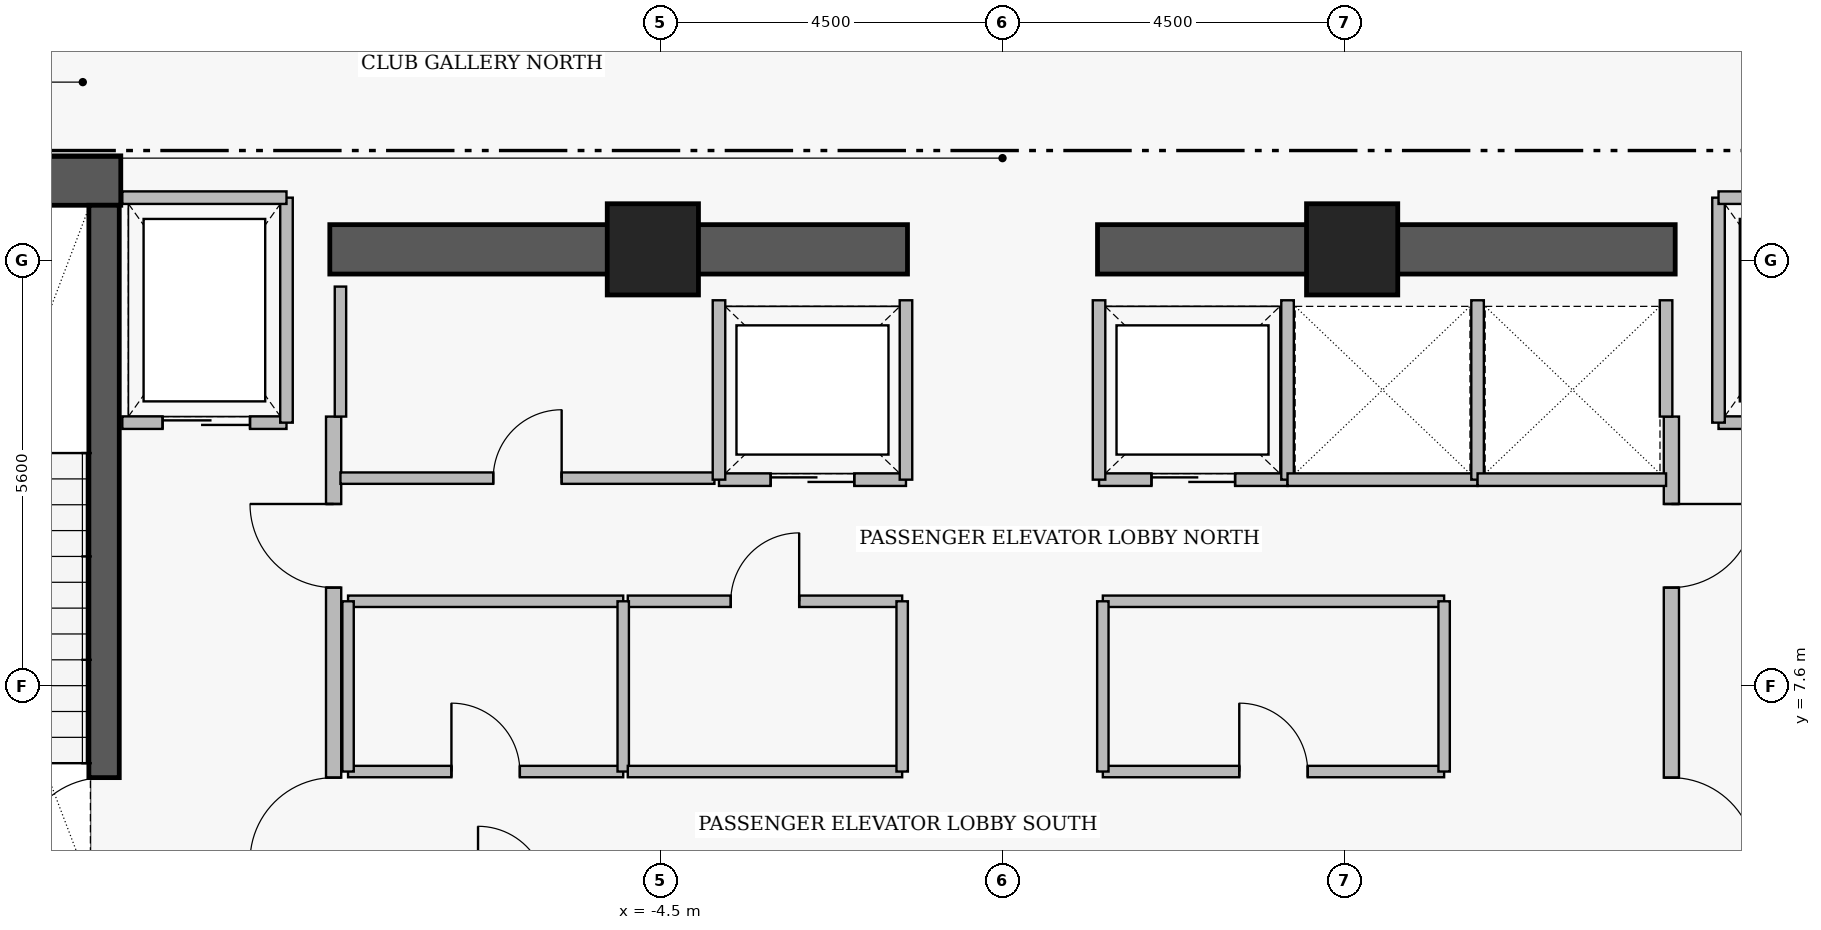
"""IFC4 building model, lengths in metres.
Left out: names, types, materials, properties, quantities, classifications, styles, units other than length and angle.
Written with IfcOpenShell. Run it as: python <this file> out.ifc"""

import sys

from ifc_helpers import new_model, si_unit, direction, frame, frame_2d, origin, origin_2d, place, context, subcontext, project, spatial, rectangle, extrude, element, fill, save


model = new_model("IFC4")
c1 = context("Model", 3, precision=1e-05, world=origin(), true_north=direction((0.0, 1.0)))
c2 = subcontext(c1, "Body", "Model", "MODEL_VIEW")
j1 = project(units=[si_unit("LENGTHUNIT", "METRE"), si_unit("PLANEANGLEUNIT", "RADIAN")], contexts=[c1])
p1 = place(None, origin())
s1 = spatial("IfcSite", under=j1, at=p1, CompositionType="ELEMENT")
p2 = place(p1, origin())
s2 = spatial("IfcBuilding", under=s1, at=p2, CompositionType="ELEMENT")
p3 = place(p2, frame((0.0, 0.0, 172.8)))
s3 = spatial("IfcBuildingStorey", under=s2, at=p3, CompositionType="ELEMENT", Elevation=172.8)
p4 = place(p3, frame((-16.06, 14.255, 0.0), z_axis=(0.0, 0.0, 1.0), x_axis=(1.0, 0.0, 0.0)))
e1 = element("IfcWall", 1, at=p4, inside=s3, PredefinedType="SHEAR", context=c2, shape_type="SweptSolid", body=[
    extrude(rectangle(XDim=4.46, YDim=0.65, at=frame_2d((2.23, 0.0))), origin(), (0.0, 0.0, 1.0), 4.41),
])
for number, where, z_axis, x_axis in (
    (2, (-8.85, 13.35, 0.0), (0.0, 0.0, 1.0), (1.0, 0.0, 0.0)),
    (3, (1.25, 13.35, 0.0), (0.0, 0.0, 1.0), (1.0, 0.0, 0.0)),
):
    element("IfcWall", number, at=place(p3, frame(where, z_axis=z_axis, x_axis=x_axis)), inside=s3, PredefinedType="SHEAR", context=c2, shape_type="SweptSolid", body=[
        extrude(rectangle(XDim=7.6, YDim=0.65, at=frame_2d((3.8, 0.0))), origin(), (0.0, 0.0, 1.0), 4.38),
    ])
p5 = place(p3, frame((-11.82, 4.97, 0.0), z_axis=(0.0, 0.0, 1.0), x_axis=(0.0, 1.0, 0.0)))
e4 = element("IfcWall", 4, at=p5, inside=s3, PredefinedType="SHEAR", context=c2, shape_type="SweptSolid", body=[
    extrude(rectangle(XDim=8.96, YDim=0.4, at=frame_2d((4.48, 0.0))), origin(), (0.0, 0.0, 1.0), 4.41),
])
p6 = place(p5, frame((0.31, 0.0, 0.0)))
e5 = element("IfcOpeningElement", 5, at=p6, cuts=e4, PredefinedType="OPENING", context=c2, shape_type="SweptSolid", body=[
    extrude(rectangle(XDim=1.12, YDim=2.22, at=frame_2d((0.56, 1.11))), frame((0.0, 0.21, 0.0), z_axis=(0.0, -1.0, 0.0), x_axis=(1.0, 0.0, 0.0)), (0.0, 0.0, 1.0), 0.42),
])
for number, where, z_axis, x_axis in (
    (6, (-4.6, 13.35, 0.0), (0.0, 0.0, 1.0), (1.0, 0.0, 0.0)),
    (7, (4.6, 13.35, 0.0), (0.0, 0.0, 1.0), (1.0, 0.0, 0.0)),
):
    element("IfcColumn", number, at=place(p3, frame(where, z_axis=z_axis, x_axis=x_axis)), inside=s3, PredefinedType="COLUMN", context=c2, shape_type="SweptSolid", body=[
        extrude(rectangle(XDim=1.2, YDim=1.2, at=origin_2d()), origin(), (0.0, 0.0, 1.0), 4.6),
    ])
p7 = place(p3, frame((-8.8, 5.05, 0.0), z_axis=(0.0, 0.0, 1.0), x_axis=(0.0, 1.0, 0.0)))
e8 = element("IfcWall", 8, at=p7, inside=s3, PredefinedType="PARTITIONING", context=c2, shape_type="SweptSolid", body=[
    extrude(rectangle(XDim=6.1, YDim=0.2, at=frame_2d((3.05, 0.0))), origin(), (0.0, 0.0, 1.0), 4.38),
])
p8 = place(p7, frame((0.25, 0.0, 0.0)))
e9 = element("IfcOpeningElement", 9, at=p8, cuts=e8, PredefinedType="OPENING", context=c2, shape_type="SweptSolid", body=[
    extrude(rectangle(XDim=1.1, YDim=2.2, at=frame_2d((0.55, 1.1))), frame((0.0, 0.11, 0.0), z_axis=(0.0, -1.0, 0.0), x_axis=(1.0, 0.0, 0.0)), (0.0, 0.0, 1.0), 0.22),
])
p9 = place(p7, frame((3.85, 0.0, 0.0)))
e10 = element("IfcOpeningElement", 10, at=p9, cuts=e8, PredefinedType="OPENING", context=c2, shape_type="SweptSolid", body=[
    extrude(rectangle(XDim=1.1, YDim=2.2, at=frame_2d((0.55, 1.1))), frame((0.0, 0.11, 0.0), z_axis=(0.0, -1.0, 0.0), x_axis=(1.0, 0.0, 0.0)), (0.0, 0.0, 1.0), 0.22),
])
p10 = place(p3, frame((8.8, 11.15, 0.0), z_axis=(0.0, 0.0, 1.0), x_axis=(0.0, -1.0, 0.0)))
e11 = element("IfcWall", 11, at=p10, inside=s3, PredefinedType="PARTITIONING", context=c2, shape_type="SweptSolid", body=[
    extrude(rectangle(XDim=6.1, YDim=0.2, at=frame_2d((3.05, 0.0))), origin(), (0.0, 0.0, 1.0), 4.38),
])
p11 = place(p10, frame((1.15, 0.0, 0.0)))
e12 = element("IfcOpeningElement", 12, at=p11, cuts=e11, PredefinedType="OPENING", context=c2, shape_type="SweptSolid", body=[
    extrude(rectangle(XDim=1.1, YDim=2.2, at=frame_2d((0.55, 1.1))), frame((0.0, 0.11, 0.0), z_axis=(0.0, -1.0, 0.0), x_axis=(1.0, 0.0, 0.0)), (0.0, 0.0, 1.0), 0.22),
])
p12 = place(p10, frame((4.75, 0.0, 0.0)))
e13 = element("IfcOpeningElement", 13, at=p12, cuts=e11, PredefinedType="OPENING", context=c2, shape_type="SweptSolid", body=[
    extrude(rectangle(XDim=1.1, YDim=2.2, at=frame_2d((0.55, 1.1))), frame((0.0, 0.11, 0.0), z_axis=(0.0, -1.0, 0.0), x_axis=(1.0, 0.0, 0.0)), (0.0, 0.0, 1.0), 0.22),
])
p13 = place(p3, frame((-11.58, 11.07, 0.0), z_axis=(0.0, 0.0, 1.0), x_axis=(1.0, 0.0, 0.0)))
e14 = element("IfcWall", 14, at=p13, inside=s3, PredefinedType="PARTITIONING", context=c2, shape_type="SweptSolid", body=[
    extrude(rectangle(XDim=2.16, YDim=0.165, at=frame_2d((1.08, 0.0))), origin(), (0.0, 0.0, 1.0), 4.38),
])
p14 = place(p13, frame((0.53, 0.0, 0.0)))
e15 = element("IfcOpeningElement", 15, at=p14, cuts=e14, PredefinedType="OPENING", context=c2, shape_type="SweptSolid", body=[
    extrude(rectangle(XDim=1.15, YDim=2.25, at=frame_2d((0.575, 1.125))), frame((0.0, 0.093, 0.0), z_axis=(0.0, -1.0, 0.0), x_axis=(1.0, 0.0, 0.0)), (0.0, 0.0, 1.0), 0.185),
])
p15 = place(p3, frame((9.42, 11.07, 0.0), z_axis=(0.0, 0.0, 1.0), x_axis=(1.0, 0.0, 0.0)))
e16 = element("IfcWall", 16, at=p15, inside=s3, PredefinedType="PARTITIONING", context=c2, shape_type="SweptSolid", body=[
    extrude(rectangle(XDim=2.16, YDim=0.165, at=frame_2d((1.08, 0.0))), origin(), (0.0, 0.0, 1.0), 4.38),
])
p16 = place(p15, frame((0.53, 0.0, 0.0)))
e17 = element("IfcOpeningElement", 17, at=p16, cuts=e16, PredefinedType="OPENING", context=c2, shape_type="SweptSolid", body=[
    extrude(rectangle(XDim=1.15, YDim=2.25, at=frame_2d((0.575, 1.125))), frame((0.0, 0.093, 0.0), z_axis=(0.0, -1.0, 0.0), x_axis=(1.0, 0.0, 0.0)), (0.0, 0.0, 1.0), 0.185),
])
p17 = place(p3, frame((-3.73, 10.32, 0.0), z_axis=(0.0, 0.0, 1.0), x_axis=(1.0, 0.0, 0.0)))
e18 = element("IfcWall", 18, at=p17, inside=s3, PredefinedType="PARTITIONING", context=c2, shape_type="SweptSolid", body=[
    extrude(rectangle(XDim=2.46, YDim=0.165, at=frame_2d((1.23, 0.0))), origin(), (0.0, 0.0, 1.0), 4.38),
])
p18 = place(p17, frame((0.68, 0.0, 0.0)))
e19 = element("IfcOpeningElement", 19, at=p18, cuts=e18, PredefinedType="OPENING", context=c2, shape_type="SweptSolid", body=[
    extrude(rectangle(XDim=1.1, YDim=2.25, at=frame_2d((0.55, 1.125))), frame((0.0, 0.093, 0.0), z_axis=(0.0, -1.0, 0.0), x_axis=(1.0, 0.0, 0.0)), (0.0, 0.0, 1.0), 0.185),
])
p19 = place(p3, frame((1.27, 10.32, 0.0), z_axis=(0.0, 0.0, 1.0), x_axis=(1.0, 0.0, 0.0)))
e20 = element("IfcWall", 20, at=p19, inside=s3, PredefinedType="PARTITIONING", context=c2, shape_type="SweptSolid", body=[
    extrude(rectangle(XDim=2.48, YDim=0.165, at=frame_2d((1.24, 0.0))), origin(), (0.0, 0.0, 1.0), 4.38),
])
p20 = place(p19, frame((0.69, 0.0, 0.0)))
e21 = element("IfcOpeningElement", 21, at=p20, cuts=e20, PredefinedType="OPENING", context=c2, shape_type="SweptSolid", body=[
    extrude(rectangle(XDim=1.1, YDim=2.25, at=frame_2d((0.55, 1.125))), frame((0.0, 0.093, 0.0), z_axis=(0.0, -1.0, 0.0), x_axis=(1.0, 0.0, 0.0)), (0.0, 0.0, 1.0), 0.185),
])
p21 = place(p3, frame((-8.71, 10.34, 0.0), z_axis=(0.0, 0.0, 1.0), x_axis=(1.0, 0.0, 0.0)))
e22 = element("IfcWall", 22, at=p21, inside=s3, PredefinedType="PARTITIONING", context=c2, shape_type="SweptSolid", body=[
    extrude(rectangle(XDim=4.92, YDim=0.15, at=frame_2d((2.46, 0.0))), origin(), (0.0, 0.0, 1.0), 4.38),
])
p22 = place(p21, frame((2.01, 0.0, 0.0)))
e23 = element("IfcOpeningElement", 23, at=p22, cuts=e22, PredefinedType="OPENING", context=c2, shape_type="SweptSolid", body=[
    extrude(rectangle(XDim=0.9, YDim=2.15, at=frame_2d((0.45, 1.075))), frame((0.0, 0.085, 0.0), z_axis=(0.0, -1.0, 0.0), x_axis=(1.0, 0.0, 0.0)), (0.0, 0.0, 1.0), 0.17),
])
p23 = place(p3, frame((-8.61, 6.48, 0.0), z_axis=(0.0, 0.0, 1.0), x_axis=(1.0, 0.0, 0.0)))
e24 = element("IfcWall", 24, at=p23, inside=s3, PredefinedType="PARTITIONING", context=c2, shape_type="SweptSolid", body=[
    extrude(rectangle(XDim=3.62, YDim=0.15, at=frame_2d((1.81, 0.0))), origin(), (0.0, 0.0, 1.0), 4.38),
])
p24 = place(p23, frame((1.36, 0.0, 0.0)))
e25 = element("IfcOpeningElement", 25, at=p24, cuts=e24, PredefinedType="OPENING", context=c2, shape_type="SweptSolid", body=[
    extrude(rectangle(XDim=0.9, YDim=2.15, at=frame_2d((0.45, 1.075))), frame((0.0, 0.085, 0.0), z_axis=(0.0, -1.0, 0.0), x_axis=(1.0, 0.0, 0.0)), (0.0, 0.0, 1.0), 0.17),
])
p25 = place(p3, frame((-4.93, 8.72, 0.0), z_axis=(0.0, 0.0, 1.0), x_axis=(1.0, 0.0, 0.0)))
e26 = element("IfcWall", 26, at=p25, inside=s3, PredefinedType="PARTITIONING", context=c2, shape_type="SweptSolid", body=[
    extrude(rectangle(XDim=3.61, YDim=0.15, at=frame_2d((1.805, 0.0))), origin(), (0.0, 0.0, 1.0), 4.38),
])
p26 = place(p25, frame((1.355, 0.0, 0.0)))
e27 = element("IfcOpeningElement", 27, at=p26, cuts=e26, PredefinedType="OPENING", context=c2, shape_type="SweptSolid", body=[
    extrude(rectangle(XDim=0.9, YDim=2.15, at=frame_2d((0.45, 1.075))), frame((0.0, 0.085, 0.0), z_axis=(0.0, -1.0, 0.0), x_axis=(1.0, 0.0, 0.0)), (0.0, 0.0, 1.0), 0.17),
])
p27 = place(p3, frame((1.32, 6.48, 0.0), z_axis=(0.0, 0.0, 1.0), x_axis=(1.0, 0.0, 0.0)))
e28 = element("IfcWall", 28, at=p27, inside=s3, PredefinedType="PARTITIONING", context=c2, shape_type="SweptSolid", body=[
    extrude(rectangle(XDim=4.49, YDim=0.15, at=frame_2d((2.245, 0.0))), origin(), (0.0, 0.0, 1.0), 4.38),
])
p28 = place(p27, frame((1.795, 0.0, 0.0)))
e29 = element("IfcOpeningElement", 29, at=p28, cuts=e28, PredefinedType="OPENING", context=c2, shape_type="SweptSolid", body=[
    extrude(rectangle(XDim=0.9, YDim=2.15, at=frame_2d((0.45, 1.075))), frame((0.0, 0.085, 0.0), z_axis=(0.0, -1.0, 0.0), x_axis=(1.0, 0.0, 0.0)), (0.0, 0.0, 1.0), 0.17),
])
p29 = place(p3, frame((-9.42, 11.07, 0.0), z_axis=(0.0, 0.0, 1.0), x_axis=(0.0, 1.0, 0.0)))
e30 = element("IfcWall", 30, at=p29, inside=s3, PredefinedType="PARTITIONING", context=c2, shape_type="SweptSolid", body=[
    extrude(rectangle(XDim=2.96, YDim=0.165, at=frame_2d((1.48, 0.0))), origin(), (0.0, 0.0, 1.0), 4.38),
])
p30 = place(p3, frame((-11.58, 14.03, 0.0), z_axis=(0.0, 0.0, 1.0), x_axis=(1.0, 0.0, 0.0)))
e31 = element("IfcWall", 31, at=p30, inside=s3, PredefinedType="PARTITIONING", context=c2, shape_type="SweptSolid", body=[
    extrude(rectangle(XDim=2.16, YDim=0.165, at=frame_2d((1.08, 0.0))), origin(), (0.0, 0.0, 1.0), 4.38),
])
p31 = place(p3, frame((9.42, 11.07, 0.0), z_axis=(0.0, 0.0, 1.0), x_axis=(0.0, 1.0, 0.0)))
e32 = element("IfcWall", 32, at=p31, inside=s3, PredefinedType="PARTITIONING", context=c2, shape_type="SweptSolid", body=[
    extrude(rectangle(XDim=2.96, YDim=0.165, at=frame_2d((1.48, 0.0))), origin(), (0.0, 0.0, 1.0), 4.38),
])
p32 = place(p3, frame((9.42, 14.03, 0.0), z_axis=(0.0, 0.0, 1.0), x_axis=(1.0, 0.0, 0.0)))
e33 = element("IfcWall", 33, at=p32, inside=s3, PredefinedType="PARTITIONING", context=c2, shape_type="SweptSolid", body=[
    extrude(rectangle(XDim=2.16, YDim=0.165, at=frame_2d((1.08, 0.0))), origin(), (0.0, 0.0, 1.0), 4.38),
])
for number, where, z_axis, x_axis in (
    (34, (-3.73, 10.32, 0.0), (0.0, 0.0, 1.0), (0.0, 1.0, 0.0)),
    (35, (-1.27, 10.32, 0.0), (0.0, 0.0, 1.0), (0.0, 1.0, 0.0)),
    (36, (1.27, 10.32, 0.0), (0.0, 0.0, 1.0), (0.0, 1.0, 0.0)),
    (37, (3.75, 10.32, 0.0), (0.0, 0.0, 1.0), (0.0, 1.0, 0.0)),
):
    element("IfcWall", number, at=place(p3, frame(where, z_axis=z_axis, x_axis=x_axis)), inside=s3, PredefinedType="PARTITIONING", context=c2, shape_type="SweptSolid", body=[
        extrude(rectangle(XDim=2.36, YDim=0.165, at=frame_2d((1.18, 0.0))), origin(), (0.0, 0.0, 1.0), 4.38),
    ])
p33 = place(p3, frame((3.75, 10.32, 0.0), z_axis=(0.0, 0.0, 1.0), x_axis=(1.0, 0.0, 0.0)))
e38 = element("IfcWall", 38, at=p33, inside=s3, PredefinedType="PARTITIONING", context=c2, shape_type="SweptSolid", body=[
    extrude(rectangle(XDim=2.5, YDim=0.165, at=frame_2d((1.25, 0.0))), origin(), (0.0, 0.0, 1.0), 4.38),
])
p34 = place(p3, frame((6.25, 10.32, 0.0), z_axis=(0.0, 0.0, 1.0), x_axis=(0.0, 1.0, 0.0)))
e39 = element("IfcWall", 39, at=p34, inside=s3, PredefinedType="PARTITIONING", context=c2, shape_type="SweptSolid", body=[
    extrude(rectangle(XDim=2.36, YDim=0.165, at=frame_2d((1.18, 0.0))), origin(), (0.0, 0.0, 1.0), 4.38),
])
p35 = place(p3, frame((6.25, 10.32, 0.0), z_axis=(0.0, 0.0, 1.0), x_axis=(1.0, 0.0, 0.0)))
e40 = element("IfcWall", 40, at=p35, inside=s3, PredefinedType="PARTITIONING", context=c2, shape_type="SweptSolid", body=[
    extrude(rectangle(XDim=2.48, YDim=0.165, at=frame_2d((1.24, 0.0))), origin(), (0.0, 0.0, 1.0), 4.38),
])
p36 = place(p3, frame((8.73, 11.15, 0.0), z_axis=(0.0, 0.0, 1.0), x_axis=(0.0, 1.0, 0.0)))
e41 = element("IfcWall", 41, at=p36, inside=s3, PredefinedType="PARTITIONING", context=c2, shape_type="SweptSolid", body=[
    extrude(rectangle(XDim=1.53, YDim=0.165, at=frame_2d((0.765, 0.0))), origin(), (0.0, 0.0, 1.0), 4.38),
])
p37 = place(p3, frame((-8.71, 11.15, 0.0), z_axis=(0.0, 0.0, 1.0), x_axis=(0.0, 1.0, 0.0)))
e42 = element("IfcWall", 42, at=p37, inside=s3, PredefinedType="PARTITIONING", context=c2, shape_type="SweptSolid", body=[
    extrude(rectangle(XDim=1.71, YDim=0.15, at=frame_2d((0.855, 0.0))), origin(), (0.0, 0.0, 1.0), 4.38),
])
p38 = place(p3, frame((-8.61, 8.72, 0.0), z_axis=(0.0, 0.0, 1.0), x_axis=(1.0, 0.0, 0.0)))
e43 = element("IfcWall", 43, at=p38, inside=s3, PredefinedType="PARTITIONING", context=c2, shape_type="SweptSolid", body=[
    extrude(rectangle(XDim=3.62, YDim=0.15, at=frame_2d((1.81, 0.0))), origin(), (0.0, 0.0, 1.0), 4.38),
])
for number, where, z_axis, x_axis in (
    (44, (-8.61, 6.48, 0.0), (0.0, 0.0, 1.0), (0.0, 1.0, 0.0)),
    (45, (-4.99, 6.48, 0.0), (0.0, 0.0, 1.0), (0.0, 1.0, 0.0)),
):
    element("IfcWall", number, at=place(p3, frame(where, z_axis=z_axis, x_axis=x_axis)), inside=s3, PredefinedType="PARTITIONING", context=c2, shape_type="SweptSolid", body=[
        extrude(rectangle(XDim=2.24, YDim=0.15, at=frame_2d((1.12, 0.0))), origin(), (0.0, 0.0, 1.0), 4.38),
    ])
p39 = place(p3, frame((-4.93, 6.48, 0.0), z_axis=(0.0, 0.0, 1.0), x_axis=(1.0, 0.0, 0.0)))
e46 = element("IfcWall", 46, at=p39, inside=s3, PredefinedType="PARTITIONING", context=c2, shape_type="SweptSolid", body=[
    extrude(rectangle(XDim=3.61, YDim=0.15, at=frame_2d((1.805, 0.0))), origin(), (0.0, 0.0, 1.0), 4.38),
])
p40 = place(p3, frame((-1.32, 6.48, 0.0), z_axis=(0.0, 0.0, 1.0), x_axis=(0.0, 1.0, 0.0)))
e47 = element("IfcWall", 47, at=p40, inside=s3, PredefinedType="PARTITIONING", context=c2, shape_type="SweptSolid", body=[
    extrude(rectangle(XDim=2.24, YDim=0.15, at=frame_2d((1.12, 0.0))), origin(), (0.0, 0.0, 1.0), 4.38),
])
p41 = place(p3, frame((1.32, 8.72, 0.0), z_axis=(0.0, 0.0, 1.0), x_axis=(1.0, 0.0, 0.0)))
e48 = element("IfcWall", 48, at=p41, inside=s3, PredefinedType="PARTITIONING", context=c2, shape_type="SweptSolid", body=[
    extrude(rectangle(XDim=4.49, YDim=0.15, at=frame_2d((2.245, 0.0))), origin(), (0.0, 0.0, 1.0), 4.38),
])
for number, where, z_axis, x_axis in (
    (49, (1.32, 6.48, 0.0), (0.0, 0.0, 1.0), (0.0, 1.0, 0.0)),
    (50, (5.81, 6.48, 0.0), (0.0, 0.0, 1.0), (0.0, 1.0, 0.0)),
):
    element("IfcWall", number, at=place(p3, frame(where, z_axis=z_axis, x_axis=x_axis)), inside=s3, PredefinedType="PARTITIONING", context=c2, shape_type="SweptSolid", body=[
        extrude(rectangle(XDim=2.24, YDim=0.15, at=frame_2d((1.12, 0.0))), origin(), (0.0, 0.0, 1.0), 4.38),
    ])
p42 = place(p6, origin())
e51 = element("IfcDoor", 51, at=p42, inside=s3, OperationType="SINGLE_SWING_LEFT", PredefinedType="DOOR", context=c2, shape_type="SweptSolid", body=[
    extrude(rectangle(XDim=1.12, YDim=2.22, at=frame_2d((0.56, 1.11))), frame((0.0, 0.025, 0.0), z_axis=(0.0, -1.0, 0.0), x_axis=(1.0, 0.0, 0.0)), (0.0, 0.0, 1.0), 0.05),
])
fill(e5, e51)
p43 = place(p8, origin())
e52 = element("IfcDoor", 52, at=p43, inside=s3, OperationType="SINGLE_SWING_LEFT", PredefinedType="DOOR", context=c2, shape_type="SweptSolid", body=[
    extrude(rectangle(XDim=1.1, YDim=2.2, at=frame_2d((0.55, 1.1))), frame((0.0, 0.025, 0.0), z_axis=(0.0, -1.0, 0.0), x_axis=(1.0, 0.0, 0.0)), (0.0, 0.0, 1.0), 0.05),
])
fill(e9, e52)
p44 = place(p9, origin())
e53 = element("IfcDoor", 53, at=p44, inside=s3, OperationType="SINGLE_SWING_RIGHT", PredefinedType="DOOR", context=c2, shape_type="SweptSolid", body=[
    extrude(rectangle(XDim=1.1, YDim=2.2, at=frame_2d((0.55, 1.1))), frame((0.0, 0.025, 0.0), z_axis=(0.0, -1.0, 0.0), x_axis=(1.0, 0.0, 0.0)), (0.0, 0.0, 1.0), 0.05),
])
fill(e10, e53)
p45 = place(p11, origin())
e54 = element("IfcDoor", 54, at=p45, inside=s3, OperationType="SINGLE_SWING_LEFT", PredefinedType="DOOR", context=c2, shape_type="SweptSolid", body=[
    extrude(rectangle(XDim=1.1, YDim=2.2, at=frame_2d((0.55, 1.1))), frame((0.0, 0.025, 0.0), z_axis=(0.0, -1.0, 0.0), x_axis=(1.0, 0.0, 0.0)), (0.0, 0.0, 1.0), 0.05),
])
fill(e12, e54)
p46 = place(p12, origin())
e55 = element("IfcDoor", 55, at=p46, inside=s3, OperationType="SINGLE_SWING_RIGHT", PredefinedType="DOOR", context=c2, shape_type="SweptSolid", body=[
    extrude(rectangle(XDim=1.1, YDim=2.2, at=frame_2d((0.55, 1.1))), frame((0.0, 0.025, 0.0), z_axis=(0.0, -1.0, 0.0), x_axis=(1.0, 0.0, 0.0)), (0.0, 0.0, 1.0), 0.05),
])
fill(e13, e55)
p47 = place(p14, origin())
e56 = element("IfcDoor", 56, at=p47, inside=s3, OperationType="SLIDING_TO_LEFT", PredefinedType="DOOR", context=c2, shape_type="SweptSolid", body=[
    extrude(rectangle(XDim=1.15, YDim=2.25, at=frame_2d((0.575, 1.125))), frame((0.0, 0.025, 0.0), z_axis=(0.0, -1.0, 0.0), x_axis=(1.0, 0.0, 0.0)), (0.0, 0.0, 1.0), 0.05),
])
fill(e15, e56)
p48 = place(p18, origin())
e57 = element("IfcDoor", 57, at=p48, inside=s3, OperationType="SLIDING_TO_LEFT", PredefinedType="DOOR", context=c2, shape_type="SweptSolid", body=[
    extrude(rectangle(XDim=1.1, YDim=2.25, at=frame_2d((0.55, 1.125))), frame((0.0, 0.025, 0.0), z_axis=(0.0, -1.0, 0.0), x_axis=(1.0, 0.0, 0.0)), (0.0, 0.0, 1.0), 0.05),
])
fill(e19, e57)
p49 = place(p20, origin())
e58 = element("IfcDoor", 58, at=p49, inside=s3, OperationType="SLIDING_TO_LEFT", PredefinedType="DOOR", context=c2, shape_type="SweptSolid", body=[
    extrude(rectangle(XDim=1.1, YDim=2.25, at=frame_2d((0.55, 1.125))), frame((0.0, 0.025, 0.0), z_axis=(0.0, -1.0, 0.0), x_axis=(1.0, 0.0, 0.0)), (0.0, 0.0, 1.0), 0.05),
])
fill(e21, e58)
p50 = place(p22, origin())
e59 = element("IfcDoor", 59, at=p50, inside=s3, OperationType="SINGLE_SWING_RIGHT", PredefinedType="DOOR", context=c2, shape_type="SweptSolid", body=[
    extrude(rectangle(XDim=0.9, YDim=2.15, at=frame_2d((0.45, 1.075))), frame((0.0, 0.025, 0.0), z_axis=(0.0, -1.0, 0.0), x_axis=(1.0, 0.0, 0.0)), (0.0, 0.0, 1.0), 0.05),
])
fill(e23, e59)
p51 = place(p24, origin())
e60 = element("IfcDoor", 60, at=p51, inside=s3, OperationType="SINGLE_SWING_LEFT", PredefinedType="DOOR", context=c2, shape_type="SweptSolid", body=[
    extrude(rectangle(XDim=0.9, YDim=2.15, at=frame_2d((0.45, 1.075))), frame((0.0, 0.025, 0.0), z_axis=(0.0, -1.0, 0.0), x_axis=(1.0, 0.0, 0.0)), (0.0, 0.0, 1.0), 0.05),
])
fill(e25, e60)
p52 = place(p26, origin())
e61 = element("IfcDoor", 61, at=p52, inside=s3, OperationType="SINGLE_SWING_RIGHT", PredefinedType="DOOR", context=c2, shape_type="SweptSolid", body=[
    extrude(rectangle(XDim=0.9, YDim=2.15, at=frame_2d((0.45, 1.075))), frame((0.0, 0.025, 0.0), z_axis=(0.0, -1.0, 0.0), x_axis=(1.0, 0.0, 0.0)), (0.0, 0.0, 1.0), 0.05),
])
fill(e27, e61)
p53 = place(p28, origin())
e62 = element("IfcDoor", 62, at=p53, inside=s3, OperationType="SINGLE_SWING_LEFT", PredefinedType="DOOR", context=c2, shape_type="SweptSolid", body=[
    extrude(rectangle(XDim=0.9, YDim=2.15, at=frame_2d((0.45, 1.075))), frame((0.0, 0.025, 0.0), z_axis=(0.0, -1.0, 0.0), x_axis=(1.0, 0.0, 0.0)), (0.0, 0.0, 1.0), 0.05),
])
fill(e29, e62)
save(model, sys.argv[1])
